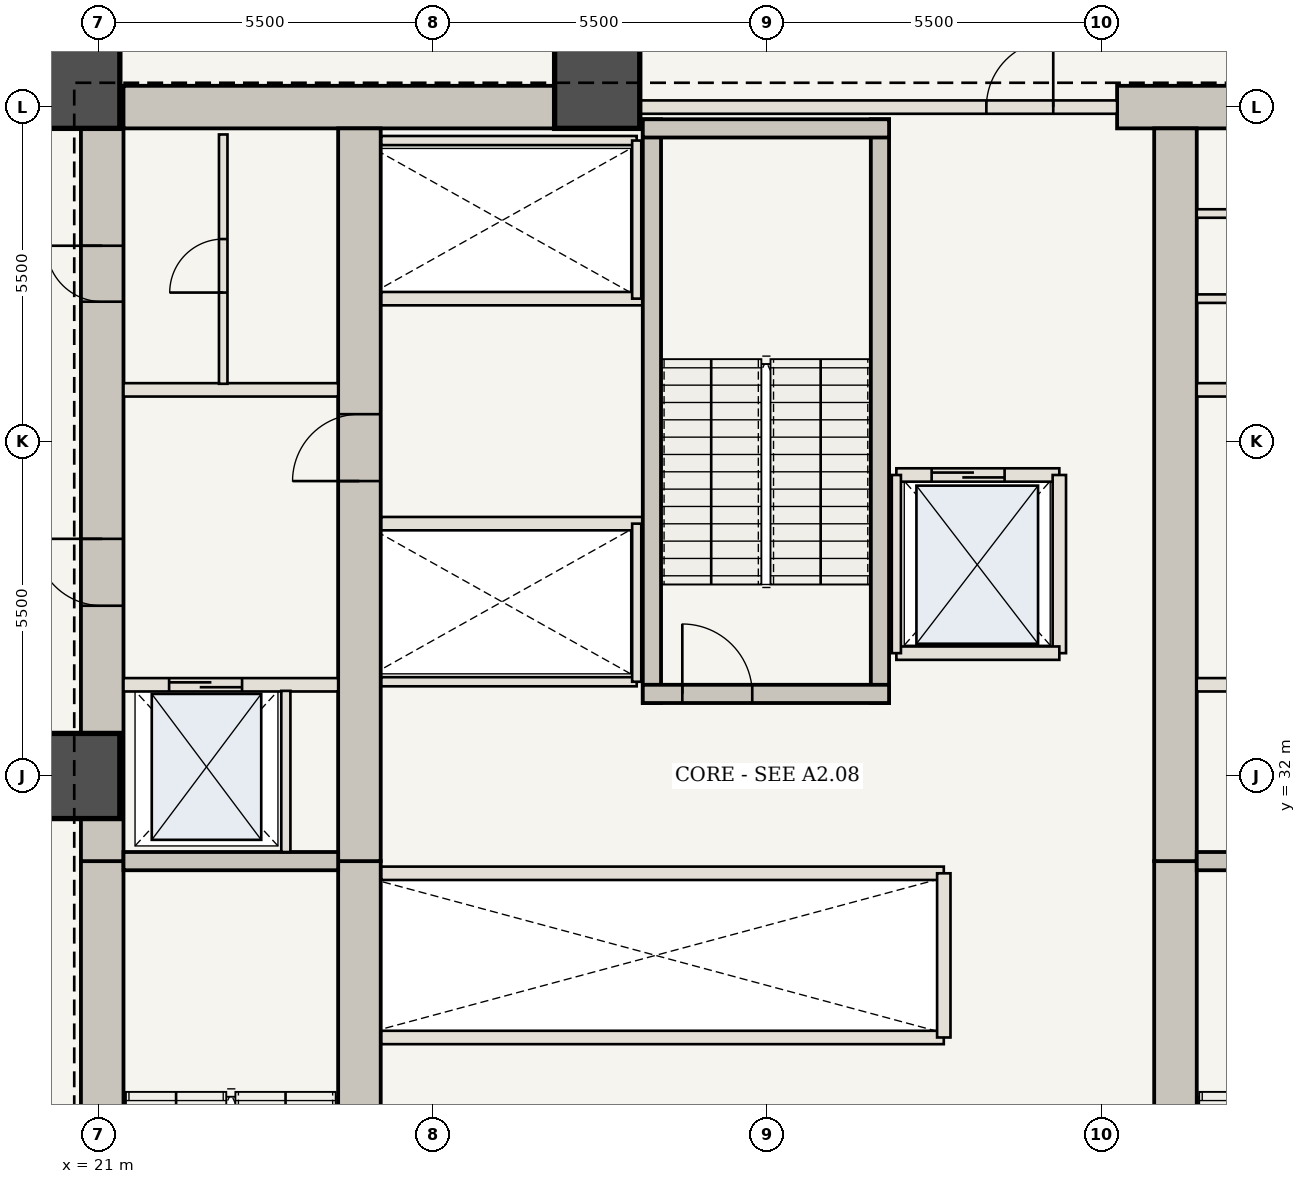
"""IFC4 building model, lengths in metres.
Left out: names, types, materials, properties, quantities, classifications, styles, units other than length and angle.
Written with IfcOpenShell. Run it as: python <this file> out.ifc"""

import sys

from ifc_helpers import new_model, si_unit, direction, frame, frame_2d, origin, origin_2d, place, context, subcontext, project, spatial, rectangle, extrude, element, fill, save


model = new_model("IFC4")
c1 = context("Model", 3, precision=1e-05, world=origin(), true_north=direction((0.0, 1.0)))
c2 = subcontext(c1, "Body", "Model", "MODEL_VIEW")
j1 = project(units=[si_unit("LENGTHUNIT", "METRE"), si_unit("PLANEANGLEUNIT", "RADIAN")], contexts=[c1])
p1 = place(None, origin())
s1 = spatial("IfcSite", under=j1, at=p1, CompositionType="ELEMENT")
p2 = place(p1, origin())
s2 = spatial("IfcBuilding", under=s1, at=p2, CompositionType="ELEMENT")
p3 = place(p2, frame((0.0, 0.0, 29.4)))
s3 = spatial("IfcBuildingStorey", under=s2, at=p3, CompositionType="ELEMENT", Elevation=29.4)
p4 = place(p3, frame((21.06, 20.6, 0.0), z_axis=(0.0, 0.0, 1.0), x_axis=(0.0, 1.0, 0.0)))
e1 = element("IfcWall", 1, at=p4, inside=s3, PredefinedType="SHEAR", context=c2, shape_type="SweptSolid", body=[
    extrude(rectangle(XDim=10.0, YDim=0.7, at=frame_2d((5.0, 0.0))), origin(), (0.0, 0.0, 1.0), 4.9),
])
p5 = place(p4, frame((1.15, 0.0, 0.0)))
e2 = element("IfcOpeningElement", 2, at=p5, cuts=e1, PredefinedType="OPENING", context=c2, shape_type="SweptSolid", body=[
    extrude(rectangle(XDim=1.15, YDim=2.15, at=frame_2d((0.575, 1.075))), frame((0.0, 0.36, 0.0), z_axis=(0.0, -1.0, 0.0), x_axis=(1.0, 0.0, 0.0)), (0.0, 0.0, 1.0), 0.72),
])
p6 = place(p3, frame((21.06, 30.6, 0.0), z_axis=(0.0, 0.0, 1.0), x_axis=(0.0, 1.0, 0.0)))
e3 = element("IfcWall", 3, at=p6, inside=s3, PredefinedType="SHEAR", context=c2, shape_type="SweptSolid", body=[
    extrude(rectangle(XDim=12.75, YDim=0.7, at=frame_2d((6.375, 0.0))), origin(), (0.0, 0.0, 1.0), 4.9),
])
p7 = place(p6, frame((4.2, 0.0, 0.0)))
e4 = element("IfcOpeningElement", 4, at=p7, cuts=e3, PredefinedType="OPENING", context=c2, shape_type="SweptSolid", body=[
    extrude(rectangle(XDim=1.1, YDim=2.15, at=frame_2d((0.55, 1.075))), frame((0.0, 0.36, 0.0), z_axis=(0.0, -1.0, 0.0), x_axis=(1.0, 0.0, 0.0)), (0.0, 0.0, 1.0), 0.72),
])
p8 = place(p6, frame((9.2, 0.0, 0.0)))
e5 = element("IfcOpeningElement", 5, at=p8, cuts=e3, PredefinedType="OPENING", context=c2, shape_type="SweptSolid", body=[
    extrude(rectangle(XDim=0.92, YDim=2.1, at=frame_2d((0.46, 1.05))), frame((0.0, 0.36, 0.0), z_axis=(0.0, -1.0, 0.0), x_axis=(1.0, 0.0, 0.0)), (0.0, 0.0, 1.0), 0.72),
])
p9 = place(p3, frame((21.41, 43.0, 0.0), z_axis=(0.0, 0.0, 1.0), x_axis=(1.0, 0.0, 0.0)))
e6 = element("IfcWall", 6, at=p9, inside=s3, PredefinedType="SHEAR", context=c2, shape_type="SweptSolid", body=[
    extrude(rectangle(XDim=8.24, YDim=0.7, at=frame_2d((4.12, 0.0))), origin(), (0.0, 0.0, 1.0), 4.9),
])
p10 = place(p3, frame((37.75, 43.0, 0.0), z_axis=(0.0, 0.0, 1.0), x_axis=(1.0, 0.0, 0.0)))
e7 = element("IfcWall", 7, at=p10, inside=s3, PredefinedType="SHEAR", context=c2, shape_type="SweptSolid", body=[
    extrude(rectangle(XDim=4.84, YDim=0.7, at=frame_2d((2.42, 0.0))), origin(), (0.0, 0.0, 1.0), 4.9),
])
p11 = place(p3, frame((25.29, 21.3, 0.0), z_axis=(0.0, 0.0, 1.0), x_axis=(0.0, 1.0, 0.0)))
e8 = element("IfcWall", 8, at=p11, inside=s3, PredefinedType="SHEAR", context=c2, shape_type="SweptSolid", body=[
    extrude(rectangle(XDim=9.3, YDim=0.7, at=frame_2d((4.65, 0.0))), origin(), (0.0, 0.0, 1.0), 4.9),
])
p12 = place(p3, frame((25.29, 30.6, 0.0), z_axis=(0.0, 0.0, 1.0), x_axis=(0.0, 1.0, 0.0)))
e9 = element("IfcWall", 9, at=p12, inside=s3, PredefinedType="SHEAR", context=c2, shape_type="SweptSolid", body=[
    extrude(rectangle(XDim=12.05, YDim=0.7, at=frame_2d((6.025, 0.0))), origin(), (0.0, 0.0, 1.0), 4.9),
])
p13 = place(p12, frame((6.25, 0.0, 0.0)))
e10 = element("IfcOpeningElement", 10, at=p13, cuts=e9, PredefinedType="OPENING", context=c2, shape_type="SweptSolid", body=[
    extrude(rectangle(XDim=1.1, YDim=2.15, at=frame_2d((0.55, 1.075))), frame((0.0, 0.36, 0.0), z_axis=(0.0, -1.0, 0.0), x_axis=(1.0, 0.0, 0.0)), (0.0, 0.0, 1.0), 0.72),
])
p14 = place(p3, frame((38.71, 21.3, 0.0), z_axis=(0.0, 0.0, 1.0), x_axis=(0.0, 1.0, 0.0)))
e11 = element("IfcWall", 11, at=p14, inside=s3, PredefinedType="SHEAR", context=c2, shape_type="SweptSolid", body=[
    extrude(rectangle(XDim=9.3, YDim=0.7, at=frame_2d((4.65, 0.0))), origin(), (0.0, 0.0, 1.0), 4.9),
])
p15 = place(p3, frame((38.71, 30.6, 0.0), z_axis=(0.0, 0.0, 1.0), x_axis=(0.0, 1.0, 0.0)))
e12 = element("IfcWall", 12, at=p15, inside=s3, PredefinedType="SHEAR", context=c2, shape_type="SweptSolid", body=[
    extrude(rectangle(XDim=12.05, YDim=0.7, at=frame_2d((6.025, 0.0))), origin(), (0.0, 0.0, 1.0), 4.9),
])
for number, where, z_axis, x_axis in (
    (13, (29.2, 43.35, 0.0), (0.0, 0.0, 1.0), (1.0, 0.0, 0.0)),
    (14, (20.65, 43.35, 0.0), (0.0, 0.0, 1.0), (1.0, 0.0, 0.0)),
    (15, (20.65, 32.0, 0.0), (0.0, 0.0, 1.0), (1.0, 0.0, 0.0)),
):
    element("IfcColumn", number, at=place(p3, frame(where, z_axis=z_axis, x_axis=x_axis)), inside=s3, PredefinedType="COLUMN", context=c2, shape_type="SweptSolid", body=[
        extrude(rectangle(XDim=1.4, YDim=1.4, at=origin_2d()), origin(), (0.0, 0.0, 1.0), 4.48),
    ])
for number, where, z_axis, x_axis in (
    (16, (21.41, 30.6, 0.0), (0.0, 0.0, 1.0), (1.0, 0.0, 0.0)),
    (17, (39.06, 30.6, 0.0), (0.0, 0.0, 1.0), (1.0, 0.0, 0.0)),
):
    element("IfcWall", number, at=place(p3, frame(where, z_axis=z_axis, x_axis=x_axis)), inside=s3, PredefinedType="SHEAR", context=c2, shape_type="SweptSolid", body=[
        extrude(rectangle(XDim=3.53, YDim=0.3, at=frame_2d((1.765, 0.0))), origin(), (0.0, 0.0, 1.0), 4.48),
    ])
p16 = place(p3, frame((21.41, 33.5, 0.0), z_axis=(0.0, 0.0, 1.0), x_axis=(1.0, 0.0, 0.0)))
e18 = element("IfcWall", 18, at=p16, inside=s3, PredefinedType="STANDARD", context=c2, shape_type="SweptSolid", body=[
    extrude(rectangle(XDim=3.53, YDim=0.22, at=frame_2d((1.765, 0.0))), origin(), (0.0, 0.0, 1.0), 4.48),
])
p17 = place(p16, frame((0.75, 0.0, 0.0)))
e19 = element("IfcOpeningElement", 19, at=p17, cuts=e18, PredefinedType="OPENING", context=c2, shape_type="SweptSolid", body=[
    extrude(rectangle(XDim=1.2, YDim=2.2, at=frame_2d((0.6, 1.1))), frame((0.0, 0.12, 0.0), z_axis=(0.0, -1.0, 0.0), x_axis=(1.0, 0.0, 0.0)), (0.0, 0.0, 1.0), 0.24),
])
p18 = place(p3, frame((24.08, 30.75, 0.0), z_axis=(0.0, 0.0, 1.0), x_axis=(0.0, 1.0, 0.0)))
e20 = element("IfcWall", 20, at=p18, inside=s3, PredefinedType="STANDARD", context=c2, shape_type="SweptSolid", body=[
    extrude(rectangle(XDim=2.65, YDim=0.15, at=frame_2d((1.325, 0.0))), origin(), (0.0, 0.0, 1.0), 4.48),
])
p19 = place(p3, frame((39.06, 33.5, 0.0), z_axis=(0.0, 0.0, 1.0), x_axis=(1.0, 0.0, 0.0)))
e21 = element("IfcWall", 21, at=p19, inside=s3, PredefinedType="STANDARD", context=c2, shape_type="SweptSolid", body=[
    extrude(rectangle(XDim=3.53, YDim=0.22, at=frame_2d((1.765, 0.0))), origin(), (0.0, 0.0, 1.0), 4.48),
])
p20 = place(p19, frame((1.55, 0.0, 0.0)))
e22 = element("IfcOpeningElement", 22, at=p20, cuts=e21, PredefinedType="OPENING", context=c2, shape_type="SweptSolid", body=[
    extrude(rectangle(XDim=1.2, YDim=2.2, at=frame_2d((0.6, 1.1))), frame((0.0, 0.12, 0.0), z_axis=(0.0, -1.0, 0.0), x_axis=(1.0, 0.0, 0.0)), (0.0, 0.0, 1.0), 0.24),
])
for number, where, z_axis, x_axis in (
    (23, (21.41, 38.35, 0.0), (0.0, 0.0, 1.0), (1.0, 0.0, 0.0)),
    (24, (39.06, 38.35, 0.0), (0.0, 0.0, 1.0), (1.0, 0.0, 0.0)),
):
    element("IfcWall", number, at=place(p3, frame(where, z_axis=z_axis, x_axis=x_axis)), inside=s3, PredefinedType="STANDARD", context=c2, shape_type="SweptSolid", body=[
        extrude(rectangle(XDim=3.53, YDim=0.22, at=frame_2d((1.765, 0.0))), origin(), (0.0, 0.0, 1.0), 4.48),
    ])
p21 = place(p3, frame((23.05, 38.45, 0.0), z_axis=(0.0, 0.0, 1.0), x_axis=(0.0, 1.0, 0.0)))
e25 = element("IfcWall", 25, at=p21, inside=s3, PredefinedType="STANDARD", context=c2, shape_type="SweptSolid", body=[
    extrude(rectangle(XDim=4.1, YDim=0.14, at=frame_2d((2.05, 0.0))), origin(), (0.0, 0.0, 1.0), 4.48),
])
p22 = place(p21, frame((1.5, 0.0, 0.0)))
e26 = element("IfcOpeningElement", 26, at=p22, cuts=e25, PredefinedType="OPENING", context=c2, shape_type="SweptSolid", body=[
    extrude(rectangle(XDim=0.88, YDim=2.1, at=frame_2d((0.44, 1.05))), frame((0.0, 0.08, 0.0), z_axis=(0.0, -1.0, 0.0), x_axis=(1.0, 0.0, 0.0)), (0.0, 0.0, 1.0), 0.16),
])
for number, where, z_axis, x_axis in (
    (27, (39.06, 39.85, 0.0), (0.0, 0.0, 1.0), (1.0, 0.0, 0.0)),
    (28, (39.06, 41.25, 0.0), (0.0, 0.0, 1.0), (1.0, 0.0, 0.0)),
):
    element("IfcWall", number, at=place(p3, frame(where, z_axis=z_axis, x_axis=x_axis)), inside=s3, PredefinedType="STANDARD", context=c2, shape_type="SweptSolid", body=[
        extrude(rectangle(XDim=3.53, YDim=0.14, at=frame_2d((1.765, 0.0))), origin(), (0.0, 0.0, 1.0), 4.48),
    ])
for number, where, z_axis, x_axis in (
    (29, (25.65, 27.7, 0.0), (0.0, 0.0, 1.0), (1.0, 0.0, 0.0)),
    (30, (25.65, 30.4, 0.0), (0.0, 0.0, 1.0), (1.0, 0.0, 0.0)),
):
    element("IfcWall", number, at=place(p3, frame(where, z_axis=z_axis, x_axis=x_axis)), inside=s3, PredefinedType="STANDARD", context=c2, shape_type="SweptSolid", body=[
        extrude(rectangle(XDim=9.25, YDim=0.22, at=frame_2d((4.625, 0.0))), origin(), (0.0, 0.0, 1.0), 4.48),
    ])
p23 = place(p3, frame((34.9, 27.7, 0.0), z_axis=(0.0, 0.0, 1.0), x_axis=(0.0, 1.0, 0.0)))
e31 = element("IfcWall", 31, at=p23, inside=s3, PredefinedType="STANDARD", context=c2, shape_type="SweptSolid", body=[
    extrude(rectangle(XDim=2.7, YDim=0.22, at=frame_2d((1.35, 0.0))), origin(), (0.0, 0.0, 1.0), 4.48),
])
p24 = place(p3, frame((25.65, 36.15, 0.0), z_axis=(0.0, 0.0, 1.0), x_axis=(1.0, 0.0, 0.0)))
e32 = element("IfcWall", 32, at=p24, inside=s3, PredefinedType="STANDARD", context=c2, shape_type="SweptSolid", body=[
    extrude(rectangle(XDim=4.3, YDim=0.22, at=frame_2d((2.15, 0.0))), origin(), (0.0, 0.0, 1.0), 4.48),
])
p25 = place(p3, frame((25.65, 33.55, 0.0), z_axis=(0.0, 0.0, 1.0), x_axis=(1.0, 0.0, 0.0)))
e33 = element("IfcWall", 33, at=p25, inside=s3, PredefinedType="STANDARD", context=c2, shape_type="SweptSolid", body=[
    extrude(rectangle(XDim=4.2, YDim=0.15, at=frame_2d((2.1, 0.0))), origin(), (0.0, 0.0, 1.0), 4.48),
])
p26 = place(p3, frame((29.85, 33.55, 0.0), z_axis=(0.0, 0.0, 1.0), x_axis=(0.0, 1.0, 0.0)))
e34 = element("IfcWall", 34, at=p26, inside=s3, PredefinedType="STANDARD", context=c2, shape_type="SweptSolid", body=[
    extrude(rectangle(XDim=2.6, YDim=0.15, at=frame_2d((1.3, 0.0))), origin(), (0.0, 0.0, 1.0), 4.48),
])
p27 = place(p3, frame((25.65, 39.85, 0.0), z_axis=(0.0, 0.0, 1.0), x_axis=(1.0, 0.0, 0.0)))
e35 = element("IfcWall", 35, at=p27, inside=s3, PredefinedType="STANDARD", context=c2, shape_type="SweptSolid", body=[
    extrude(rectangle(XDim=4.3, YDim=0.22, at=frame_2d((2.15, 0.0))), origin(), (0.0, 0.0, 1.0), 4.48),
])
p28 = place(p3, frame((25.65, 42.45, 0.0), z_axis=(0.0, 0.0, 1.0), x_axis=(1.0, 0.0, 0.0)))
e36 = element("IfcWall", 36, at=p28, inside=s3, PredefinedType="STANDARD", context=c2, shape_type="SweptSolid", body=[
    extrude(rectangle(XDim=4.2, YDim=0.15, at=frame_2d((2.1, 0.0))), origin(), (0.0, 0.0, 1.0), 4.48),
])
p29 = place(p3, frame((29.85, 39.85, 0.0), z_axis=(0.0, 0.0, 1.0), x_axis=(0.0, 1.0, 0.0)))
e37 = element("IfcWall", 37, at=p29, inside=s3, PredefinedType="STANDARD", context=c2, shape_type="SweptSolid", body=[
    extrude(rectangle(XDim=2.6, YDim=0.15, at=frame_2d((1.3, 0.0))), origin(), (0.0, 0.0, 1.0), 4.48),
])
for number, where, z_axis, x_axis in (
    (38, (30.1, 33.2, 0.0), (0.0, 0.0, 1.0), (0.0, 1.0, 0.0)),
    (39, (33.85, 33.2, 0.0), (0.0, 0.0, 1.0), (0.0, 1.0, 0.0)),
):
    element("IfcWall", number, at=place(p3, frame(where, z_axis=z_axis, x_axis=x_axis)), inside=s3, PredefinedType="SHEAR", context=c2, shape_type="SweptSolid", body=[
        extrude(rectangle(XDim=9.6, YDim=0.3, at=frame_2d((4.8, 0.0))), origin(), (0.0, 0.0, 1.0), 4.48),
    ])
p30 = place(p3, frame((29.95, 33.35, 0.0), z_axis=(0.0, 0.0, 1.0), x_axis=(1.0, 0.0, 0.0)))
e40 = element("IfcWall", 40, at=p30, inside=s3, PredefinedType="SHEAR", context=c2, shape_type="SweptSolid", body=[
    extrude(rectangle(XDim=4.05, YDim=0.3, at=frame_2d((2.025, 0.0))), origin(), (0.0, 0.0, 1.0), 4.48),
])
p31 = place(p30, frame((0.65, 0.0, 0.0)))
e41 = element("IfcOpeningElement", 41, at=p31, cuts=e40, PredefinedType="OPENING", context=c2, shape_type="SweptSolid", body=[
    extrude(rectangle(XDim=1.15, YDim=2.15, at=frame_2d((0.575, 1.075))), frame((0.0, 0.16, 0.0), z_axis=(0.0, -1.0, 0.0), x_axis=(1.0, 0.0, 0.0)), (0.0, 0.0, 1.0), 0.32),
])
p32 = place(p3, frame((29.95, 42.65, 0.0), z_axis=(0.0, 0.0, 1.0), x_axis=(1.0, 0.0, 0.0)))
e42 = element("IfcWall", 42, at=p32, inside=s3, PredefinedType="SHEAR", context=c2, shape_type="SweptSolid", body=[
    extrude(rectangle(XDim=4.05, YDim=0.3, at=frame_2d((2.025, 0.0))), origin(), (0.0, 0.0, 1.0), 4.48),
])
p33 = place(p3, frame((29.65, 43.0, 0.0), z_axis=(0.0, 0.0, 1.0), x_axis=(1.0, 0.0, 0.0)))
e43 = element("IfcWall", 43, at=p33, inside=s3, PredefinedType="STANDARD", context=c2, shape_type="SweptSolid", body=[
    extrude(rectangle(XDim=8.1, YDim=0.22, at=frame_2d((4.05, 0.0))), origin(), (0.0, 0.0, 1.0), 4.48),
])
p34 = place(p33, frame((5.95, 0.0, 0.0)))
e44 = element("IfcOpeningElement", 44, at=p34, cuts=e43, PredefinedType="OPENING", context=c2, shape_type="SweptSolid", body=[
    extrude(rectangle(XDim=1.1, YDim=2.15, at=frame_2d((0.55, 1.075))), frame((0.0, 0.12, 0.0), z_axis=(0.0, -1.0, 0.0), x_axis=(1.0, 0.0, 0.0)), (0.0, 0.0, 1.0), 0.24),
])
p35 = place(p3, frame((34.12, 36.95, 0.0), z_axis=(0.0, 0.0, 1.0), x_axis=(1.0, 0.0, 0.0)))
e45 = element("IfcWall", 45, at=p35, inside=s3, PredefinedType="STANDARD", context=c2, shape_type="SweptSolid", body=[
    extrude(rectangle(XDim=2.68, YDim=0.22, at=frame_2d((1.34, 0.0))), origin(), (0.0, 0.0, 1.0), 4.48),
])
p36 = place(p35, frame((0.58, 0.0, 0.0)))
e46 = element("IfcOpeningElement", 46, at=p36, cuts=e45, PredefinedType="OPENING", context=c2, shape_type="SweptSolid", body=[
    extrude(rectangle(XDim=1.2, YDim=2.2, at=frame_2d((0.6, 1.1))), frame((0.0, 0.12, 0.0), z_axis=(0.0, -1.0, 0.0), x_axis=(1.0, 0.0, 0.0)), (0.0, 0.0, 1.0), 0.24),
])
p37 = place(p3, frame((36.8, 34.02, 0.0), z_axis=(0.0, 0.0, 1.0), x_axis=(0.0, 1.0, 0.0)))
e47 = element("IfcWall", 47, at=p37, inside=s3, PredefinedType="STANDARD", context=c2, shape_type="SweptSolid", body=[
    extrude(rectangle(XDim=2.93, YDim=0.22, at=frame_2d((1.465, 0.0))), origin(), (0.0, 0.0, 1.0), 4.48),
])
p38 = place(p3, frame((34.12, 34.02, 0.0), z_axis=(0.0, 0.0, 1.0), x_axis=(1.0, 0.0, 0.0)))
e48 = element("IfcWall", 48, at=p38, inside=s3, PredefinedType="STANDARD", context=c2, shape_type="SweptSolid", body=[
    extrude(rectangle(XDim=2.68, YDim=0.22, at=frame_2d((1.34, 0.0))), origin(), (0.0, 0.0, 1.0), 4.48),
])
p39 = place(p3, frame((34.12, 34.02, 0.0), z_axis=(0.0, 0.0, 1.0), x_axis=(0.0, 1.0, 0.0)))
e49 = element("IfcWall", 49, at=p39, inside=s3, PredefinedType="STANDARD", context=c2, shape_type="SweptSolid", body=[
    extrude(rectangle(XDim=2.93, YDim=0.15, at=frame_2d((1.465, 0.0))), origin(), (0.0, 0.0, 1.0), 4.48),
])
p40 = place(p7, origin())
e50 = element("IfcDoor", 50, at=p40, inside=s3, OperationType="SINGLE_SWING_RIGHT", PredefinedType="DOOR", context=c2, shape_type="SweptSolid", body=[
    extrude(rectangle(XDim=1.1, YDim=2.15, at=frame_2d((0.55, 1.075))), frame((0.0, 0.025, 0.0), z_axis=(0.0, -1.0, 0.0), x_axis=(1.0, 0.0, 0.0)), (0.0, 0.0, 1.0), 0.05),
])
fill(e4, e50)
p41 = place(p13, origin())
e51 = element("IfcDoor", 51, at=p41, inside=s3, OperationType="SINGLE_SWING_LEFT", PredefinedType="DOOR", context=c2, shape_type="SweptSolid", body=[
    extrude(rectangle(XDim=1.1, YDim=2.15, at=frame_2d((0.55, 1.075))), frame((0.0, 0.025, 0.0), z_axis=(0.0, -1.0, 0.0), x_axis=(1.0, 0.0, 0.0)), (0.0, 0.0, 1.0), 0.05),
])
fill(e10, e51)
p42 = place(p8, origin())
e52 = element("IfcDoor", 52, at=p42, inside=s3, OperationType="SINGLE_SWING_RIGHT", PredefinedType="DOOR", context=c2, shape_type="SweptSolid", body=[
    extrude(rectangle(XDim=0.92, YDim=2.1, at=frame_2d((0.46, 1.05))), frame((0.0, 0.025, 0.0), z_axis=(0.0, -1.0, 0.0), x_axis=(1.0, 0.0, 0.0)), (0.0, 0.0, 1.0), 0.05),
])
fill(e5, e52)
p43 = place(p17, origin())
e53 = element("IfcDoor", 53, at=p43, inside=s3, OperationType="DOUBLE_DOOR_SLIDING", PredefinedType="DOOR", context=c2, shape_type="SweptSolid", body=[
    extrude(rectangle(XDim=1.2, YDim=2.2, at=frame_2d((0.6, 1.1))), frame((0.0, 0.025, 0.0), z_axis=(0.0, -1.0, 0.0), x_axis=(1.0, 0.0, 0.0)), (0.0, 0.0, 1.0), 0.05),
])
fill(e19, e53)
p44 = place(p22, origin())
e54 = element("IfcDoor", 54, at=p44, inside=s3, OperationType="SINGLE_SWING_LEFT", PredefinedType="DOOR", context=c2, shape_type="SweptSolid", body=[
    extrude(rectangle(XDim=0.88, YDim=2.1, at=frame_2d((0.44, 1.05))), frame((0.0, 0.025, 0.0), z_axis=(0.0, -1.0, 0.0), x_axis=(1.0, 0.0, 0.0)), (0.0, 0.0, 1.0), 0.05),
])
fill(e26, e54)
p45 = place(p31, origin())
e55 = element("IfcDoor", 55, at=p45, inside=s3, OperationType="SINGLE_SWING_LEFT", PredefinedType="DOOR", context=c2, shape_type="SweptSolid", body=[
    extrude(rectangle(XDim=1.15, YDim=2.15, at=frame_2d((0.575, 1.075))), frame((0.0, 0.025, 0.0), z_axis=(0.0, -1.0, 0.0), x_axis=(1.0, 0.0, 0.0)), (0.0, 0.0, 1.0), 0.05),
])
fill(e41, e55)
p46 = place(p34, origin())
e56 = element("IfcDoor", 56, at=p46, inside=s3, OperationType="SINGLE_SWING_RIGHT", PredefinedType="DOOR", context=c2, shape_type="SweptSolid", body=[
    extrude(rectangle(XDim=1.1, YDim=2.15, at=frame_2d((0.55, 1.075))), frame((0.0, 0.025, 0.0), z_axis=(0.0, -1.0, 0.0), x_axis=(1.0, 0.0, 0.0)), (0.0, 0.0, 1.0), 0.05),
])
fill(e44, e56)
p47 = place(p36, origin())
e57 = element("IfcDoor", 57, at=p47, inside=s3, OperationType="DOUBLE_DOOR_SLIDING", PredefinedType="DOOR", context=c2, shape_type="SweptSolid", body=[
    extrude(rectangle(XDim=1.2, YDim=2.2, at=frame_2d((0.6, 1.1))), frame((0.0, 0.025, 0.0), z_axis=(0.0, -1.0, 0.0), x_axis=(1.0, 0.0, 0.0)), (0.0, 0.0, 1.0), 0.05),
])
fill(e46, e57)
save(model, sys.argv[1])
